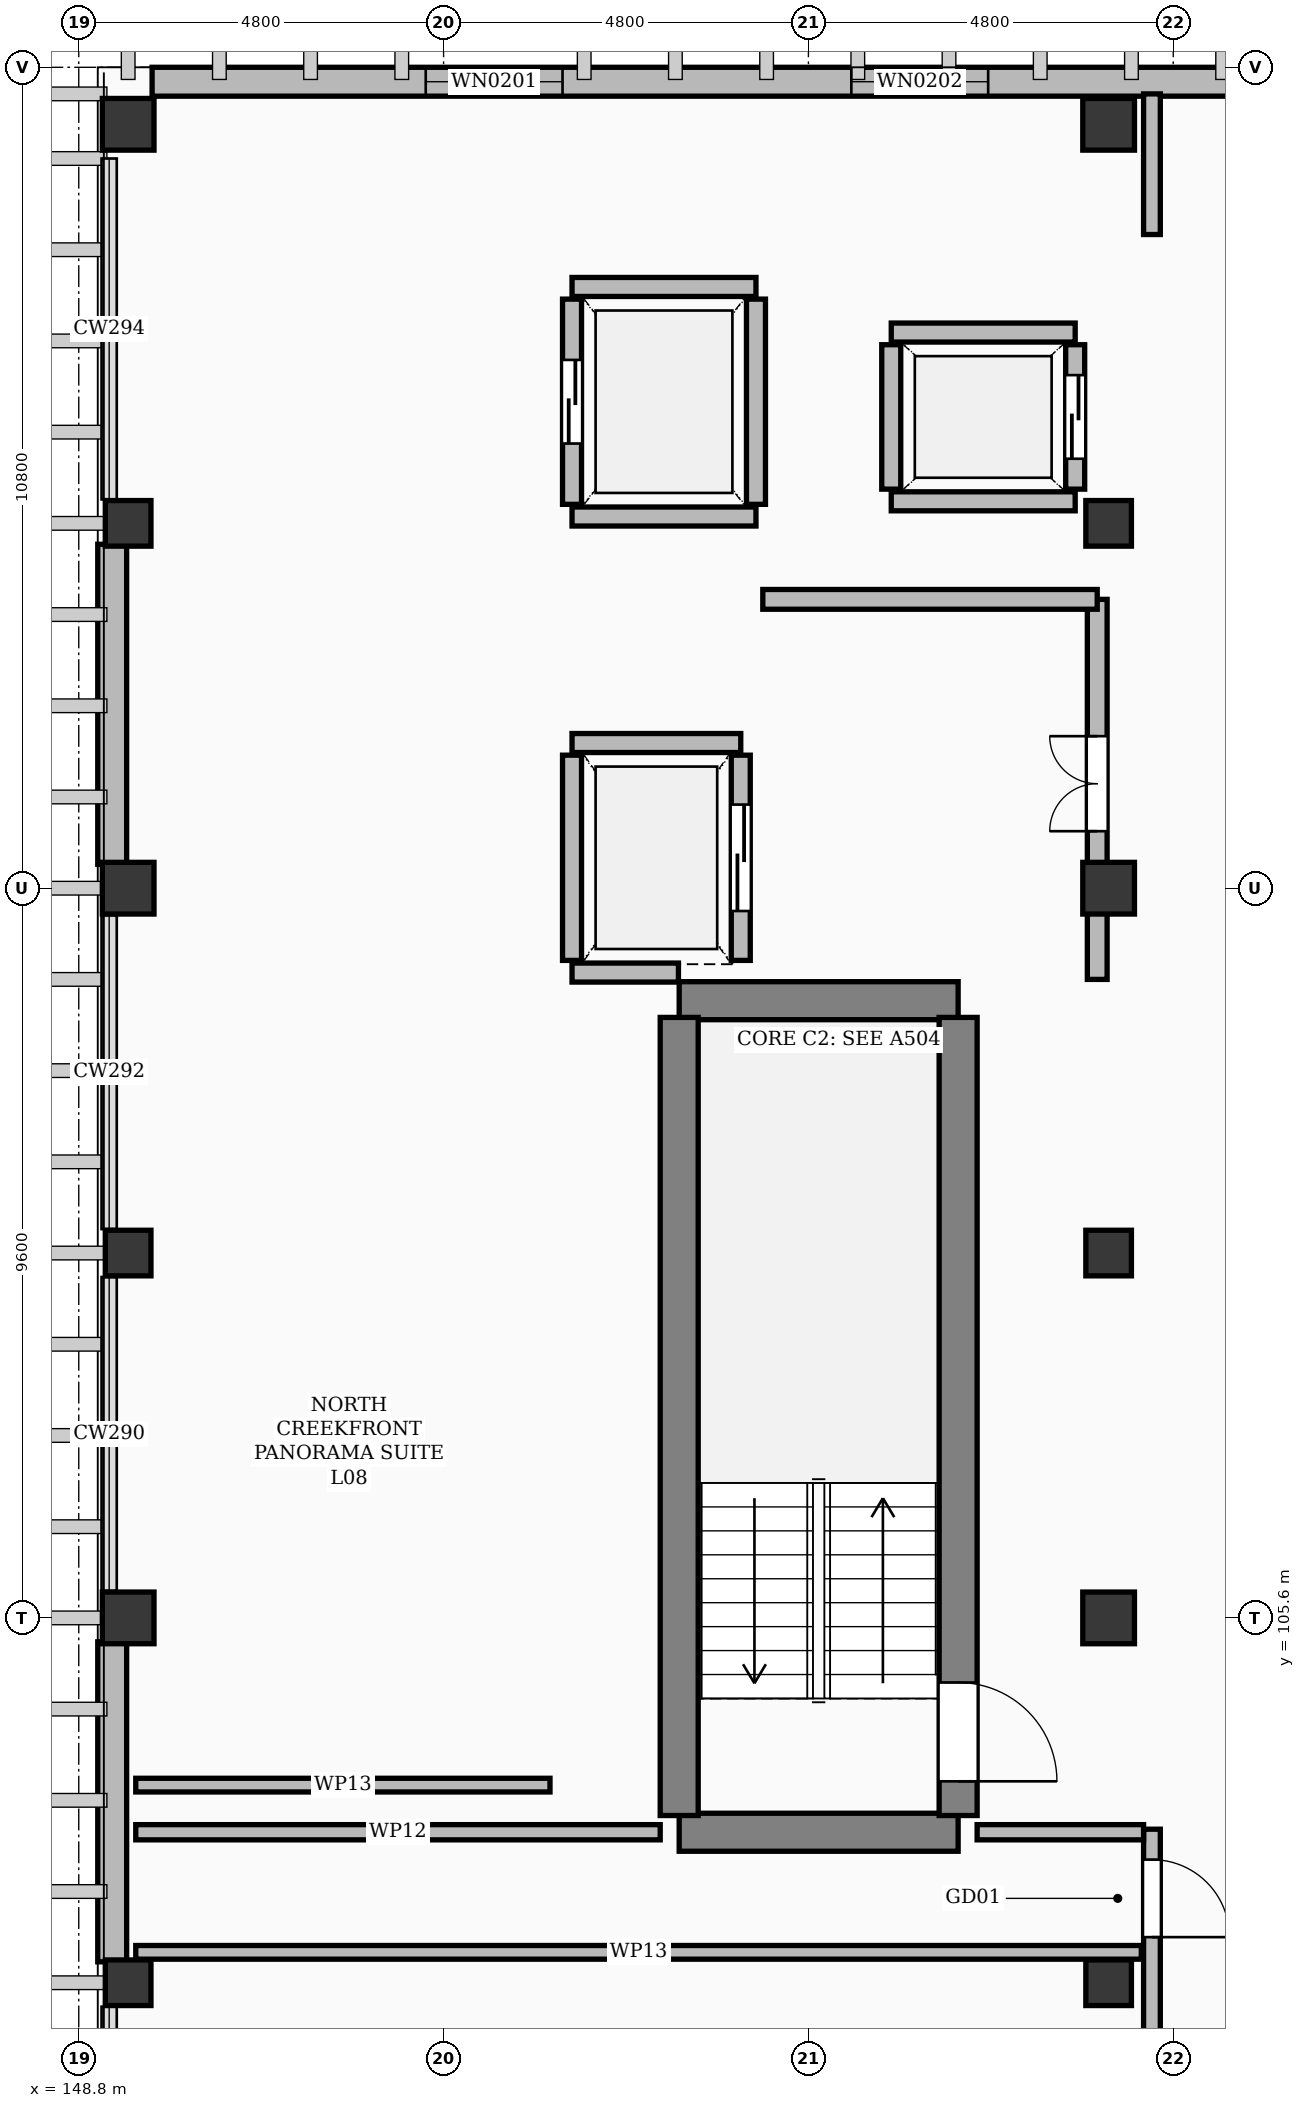
"""IFC4 building model, lengths in metres.
Left out: names, types, materials, properties, quantities, classifications, styles, units other than length and angle.
Written with IfcOpenShell. Run it as: python <this file> out.ifc"""

import sys

from ifc_helpers import new_model, si_unit, direction, frame, frame_2d, origin, origin_2d, place, context, subcontext, project, spatial, rectangle, extrude, element, fill, save


model = new_model("IFC4")
c1 = context("Model", 3, precision=1e-05, world=origin(), true_north=direction((0.0, 1.0)))
c2 = subcontext(c1, "Body", "Model", "MODEL_VIEW")
j1 = project(units=[si_unit("LENGTHUNIT", "METRE"), si_unit("PLANEANGLEUNIT", "RADIAN")], contexts=[c1])
p1 = place(None, origin())
s1 = spatial("IfcSite", under=j1, at=p1, CompositionType="ELEMENT")
p2 = place(p1, origin())
s2 = spatial("IfcBuilding", under=s1, at=p2, CompositionType="ELEMENT")
p3 = place(p2, frame((0.0, 0.0, 35.4)))
s3 = spatial("IfcBuildingStorey", under=s2, at=p3, CompositionType="ELEMENT", Elevation=35.4)
for number, where, z_axis, x_axis in (
    (1, (149.45, 105.6, 0.0), (0.0, 0.0, 1.0), (1.0, 0.0, 0.0)),
    (2, (149.45, 115.2, 0.0), (0.0, 0.0, 1.0), (1.0, 0.0, 0.0)),
    (3, (149.45, 125.25, 0.0), (0.0, 0.0, 1.0), (1.0, 0.0, 0.0)),
    (4, (162.35, 105.6, 0.0), (0.0, 0.0, 1.0), (1.0, 0.0, 0.0)),
    (5, (162.35, 115.2, 0.0), (0.0, 0.0, 1.0), (1.0, 0.0, 0.0)),
    (6, (162.35, 125.25, 0.0), (0.0, 0.0, 1.0), (1.0, 0.0, 0.0)),
):
    element("IfcColumn", number, at=place(p3, frame(where, z_axis=z_axis, x_axis=x_axis)), inside=s3, PredefinedType="COLUMN", context=c2, shape_type="SweptSolid", body=[
        extrude(rectangle(XDim=0.68, YDim=0.68, at=origin_2d()), origin(), (0.0, 0.0, 1.0), 3.6),
    ])
for number, where, z_axis, x_axis in (
    (7, (149.45, 100.8, 0.0), (0.0, 0.0, 1.0), (1.0, 0.0, 0.0)),
    (8, (149.45, 110.4, 0.0), (0.0, 0.0, 1.0), (1.0, 0.0, 0.0)),
    (9, (149.45, 120.0, 0.0), (0.0, 0.0, 1.0), (1.0, 0.0, 0.0)),
    (10, (162.35, 100.8, 0.0), (0.0, 0.0, 1.0), (1.0, 0.0, 0.0)),
    (11, (162.35, 110.4, 0.0), (0.0, 0.0, 1.0), (1.0, 0.0, 0.0)),
    (12, (162.35, 120.0, 0.0), (0.0, 0.0, 1.0), (1.0, 0.0, 0.0)),
):
    element("IfcColumn", number, at=place(p3, frame(where, z_axis=z_axis, x_axis=x_axis)), inside=s3, PredefinedType="COLUMN", context=c2, shape_type="SweptSolid", body=[
        extrude(rectangle(XDim=0.6, YDim=0.6, at=origin_2d()), origin(), (0.0, 0.0, 1.0), 3.6),
    ])
p4 = place(p3, frame((149.765, 125.81, 0.0), z_axis=(0.0, 0.0, 1.0), x_axis=(1.0, 0.0, 0.0)))
e13 = element("IfcWall", 13, at=p4, inside=s3, PredefinedType="SOLIDWALL", context=c2, shape_type="SweptSolid", body=[
    extrude(rectangle(XDim=29.27, YDim=0.38, at=frame_2d((14.635, 0.0))), origin(), (0.0, 0.0, 1.0), 3.36),
])
p5 = place(p4, frame((3.6, 0.0, 0.55)))
e14 = element("IfcOpeningElement", 14, at=p5, cuts=e13, PredefinedType="OPENING", context=c2, shape_type="SweptSolid", body=[
    extrude(rectangle(XDim=1.8, YDim=1.76, at=frame_2d((0.9, 0.88))), frame((0.0, 0.202, 0.0), z_axis=(0.0, -1.0, 0.0), x_axis=(1.0, 0.0, 0.0)), (0.0, 0.0, 1.0), 0.404),
])
p6 = place(p4, frame((9.2, 0.0, 0.55)))
e15 = element("IfcOpeningElement", 15, at=p6, cuts=e13, PredefinedType="OPENING", context=c2, shape_type="SweptSolid", body=[
    extrude(rectangle(XDim=1.8, YDim=1.76, at=frame_2d((0.9, 0.88))), frame((0.0, 0.202, 0.0), z_axis=(0.0, -1.0, 0.0), x_axis=(1.0, 0.0, 0.0)), (0.0, 0.0, 1.0), 0.404),
])
p7 = place(p4, frame((19.6, 0.0, 0.55)))
e16 = element("IfcOpeningElement", 16, at=p7, cuts=e13, PredefinedType="OPENING", context=c2, shape_type="SweptSolid", body=[
    extrude(rectangle(XDim=1.8, YDim=1.76, at=frame_2d((0.9, 0.88))), frame((0.0, 0.202, 0.0), z_axis=(0.0, -1.0, 0.0), x_axis=(1.0, 0.0, 0.0)), (0.0, 0.0, 1.0), 0.404),
])
p8 = place(p4, frame((25.2, 0.0, 0.55)))
e17 = element("IfcOpeningElement", 17, at=p8, cuts=e13, PredefinedType="OPENING", context=c2, shape_type="SweptSolid", body=[
    extrude(rectangle(XDim=1.8, YDim=1.76, at=frame_2d((0.9, 0.88))), frame((0.0, 0.202, 0.0), z_axis=(0.0, -1.0, 0.0), x_axis=(1.0, 0.0, 0.0)), (0.0, 0.0, 1.0), 0.404),
])
p9 = place(p3, frame((149.24, 101.075, 0.0), z_axis=(0.0, 0.0, 1.0), x_axis=(0.0, 1.0, 0.0)))
e18 = element("IfcWall", 18, at=p9, inside=s3, PredefinedType="SOLIDWALL", context=c2, shape_type="SweptSolid", body=[
    extrude(rectangle(XDim=4.21, YDim=0.38, at=frame_2d((2.105, 0.0))), origin(), (0.0, 0.0, 1.0), 2.732),
])
p10 = place(p3, frame((149.24, 115.515, 0.0), z_axis=(0.0, 0.0, 1.0), x_axis=(0.0, 1.0, 0.0)))
e19 = element("IfcWall", 19, at=p10, inside=s3, PredefinedType="SOLIDWALL", context=c2, shape_type="SweptSolid", body=[
    extrude(rectangle(XDim=4.21, YDim=0.38, at=frame_2d((2.105, 0.0))), origin(), (0.0, 0.0, 1.0), 2.732),
])
for number, where, z_axis, x_axis in (
    (20, (156.7, 102.78, 0.0), (0.0, 0.0, 1.0), (1.0, 0.0, 0.0)),
    (21, (156.7, 113.72, 0.0), (0.0, 0.0, 1.0), (1.0, 0.0, 0.0)),
):
    element("IfcWall", number, at=place(p3, frame(where, z_axis=z_axis, x_axis=x_axis)), inside=s3, PredefinedType="SHEAR", context=c2, shape_type="SweptSolid", body=[
        extrude(rectangle(XDim=3.67, YDim=0.5, at=frame_2d((1.835, 0.0))), origin(), (0.0, 0.0, 1.0), 3.36),
    ])
p11 = place(p3, frame((156.7, 103.0, 0.0), z_axis=(0.0, 0.0, 1.0), x_axis=(0.0, 1.0, 0.0)))
e22 = element("IfcWall", 22, at=p11, inside=s3, PredefinedType="SHEAR", context=c2, shape_type="SweptSolid", body=[
    extrude(rectangle(XDim=10.5, YDim=0.5, at=frame_2d((5.25, 0.0))), origin(), (0.0, 0.0, 1.0), 3.36),
])
p12 = place(p3, frame((160.37, 103.0, 0.0), z_axis=(0.0, 0.0, 1.0), x_axis=(0.0, 1.0, 0.0)))
e23 = element("IfcWall", 23, at=p12, inside=s3, PredefinedType="SHEAR", context=c2, shape_type="SweptSolid", body=[
    extrude(rectangle(XDim=10.5, YDim=0.5, at=frame_2d((5.25, 0.0))), origin(), (0.0, 0.0, 1.0), 3.36),
])
p13 = place(p12, frame((0.45, 0.0, 0.0)))
e24 = element("IfcOpeningElement", 24, at=p13, cuts=e23, PredefinedType="OPENING", context=c2, shape_type="SweptSolid", body=[
    extrude(rectangle(XDim=1.3, YDim=2.15, at=frame_2d((0.65, 1.075))), frame((0.0, 0.262, 0.0), z_axis=(0.0, -1.0, 0.0), x_axis=(1.0, 0.0, 0.0)), (0.0, 0.0, 1.0), 0.524),
])
p14 = place(p3, frame((155.29, 114.09, 0.0), z_axis=(0.0, 0.0, 1.0), x_axis=(1.0, 0.0, 0.0)))
e25 = element("IfcWall", 25, at=p14, inside=s3, PredefinedType="SOLIDWALL", context=c2, shape_type="SweptSolid", body=[
    extrude(rectangle(XDim=1.4, YDim=0.25, at=frame_2d((0.7, 0.0))), origin(), (0.0, 0.0, 1.0), 3.36),
])
p15 = place(p3, frame((155.29, 117.11, 0.0), z_axis=(0.0, 0.0, 1.0), x_axis=(1.0, 0.0, 0.0)))
e26 = element("IfcWall", 26, at=p15, inside=s3, PredefinedType="SOLIDWALL", context=c2, shape_type="SweptSolid", body=[
    extrude(rectangle(XDim=2.22, YDim=0.25, at=frame_2d((1.11, 0.0))), origin(), (0.0, 0.0, 1.0), 3.36),
])
p16 = place(p3, frame((155.29, 114.25, 0.0), z_axis=(0.0, 0.0, 1.0), x_axis=(0.0, 1.0, 0.0)))
e27 = element("IfcWall", 27, at=p16, inside=s3, PredefinedType="SOLIDWALL", context=c2, shape_type="SweptSolid", body=[
    extrude(rectangle(XDim=2.7, YDim=0.25, at=frame_2d((1.35, 0.0))), origin(), (0.0, 0.0, 1.0), 2.732),
])
p17 = place(p3, frame((157.51, 114.25, 0.0), z_axis=(0.0, 0.0, 1.0), x_axis=(0.0, 1.0, 0.0)))
e28 = element("IfcWall", 28, at=p17, inside=s3, PredefinedType="SOLIDWALL", context=c2, shape_type="SweptSolid", body=[
    extrude(rectangle(XDim=2.7, YDim=0.25, at=frame_2d((1.35, 0.0))), origin(), (0.0, 0.0, 1.0), 2.732),
])
p18 = place(p17, frame((0.65, 0.0, 0.0)))
e29 = element("IfcOpeningElement", 29, at=p18, cuts=e28, PredefinedType="OPENING", context=c2, shape_type="SweptSolid", body=[
    extrude(rectangle(XDim=1.4, YDim=2.3, at=frame_2d((0.7, 1.15))), frame((0.0, 0.137, 0.0), z_axis=(0.0, -1.0, 0.0), x_axis=(1.0, 0.0, 0.0)), (0.0, 0.0, 1.0), 0.274),
])
p19 = place(p3, frame((159.49, 120.29, 0.0), z_axis=(0.0, 0.0, 1.0), x_axis=(1.0, 0.0, 0.0)))
e30 = element("IfcWall", 30, at=p19, inside=s3, PredefinedType="SOLIDWALL", context=c2, shape_type="SweptSolid", body=[
    extrude(rectangle(XDim=2.42, YDim=0.25, at=frame_2d((1.21, 0.0))), origin(), (0.0, 0.0, 1.0), 2.732),
])
p20 = place(p3, frame((159.49, 122.51, 0.0), z_axis=(0.0, 0.0, 1.0), x_axis=(1.0, 0.0, 0.0)))
e31 = element("IfcWall", 31, at=p20, inside=s3, PredefinedType="SOLIDWALL", context=c2, shape_type="SweptSolid", body=[
    extrude(rectangle(XDim=2.42, YDim=0.25, at=frame_2d((1.21, 0.0))), origin(), (0.0, 0.0, 1.0), 3.36),
])
p21 = place(p3, frame((159.49, 120.45, 0.0), z_axis=(0.0, 0.0, 1.0), x_axis=(0.0, 1.0, 0.0)))
e32 = element("IfcWall", 32, at=p21, inside=s3, PredefinedType="SOLIDWALL", context=c2, shape_type="SweptSolid", body=[
    extrude(rectangle(XDim=1.9, YDim=0.25, at=frame_2d((0.95, 0.0))), origin(), (0.0, 0.0, 1.0), 3.36),
])
p22 = place(p3, frame((161.91, 120.45, 0.0), z_axis=(0.0, 0.0, 1.0), x_axis=(0.0, 1.0, 0.0)))
e33 = element("IfcWall", 33, at=p22, inside=s3, PredefinedType="SOLIDWALL", context=c2, shape_type="SweptSolid", body=[
    extrude(rectangle(XDim=1.9, YDim=0.25, at=frame_2d((0.95, 0.0))), origin(), (0.0, 0.0, 1.0), 3.36),
])
p23 = place(p22, frame((0.4, 0.0, 0.0)))
e34 = element("IfcOpeningElement", 34, at=p23, cuts=e33, PredefinedType="OPENING", context=c2, shape_type="SweptSolid", body=[
    extrude(rectangle(XDim=1.1, YDim=2.2, at=frame_2d((0.55, 1.1))), frame((0.0, 0.137, 0.0), z_axis=(0.0, -1.0, 0.0), x_axis=(1.0, 0.0, 0.0)), (0.0, 0.0, 1.0), 0.274),
])
p24 = place(p3, frame((155.29, 120.09, 0.0), z_axis=(0.0, 0.0, 1.0), x_axis=(1.0, 0.0, 0.0)))
e35 = element("IfcWall", 35, at=p24, inside=s3, PredefinedType="SOLIDWALL", context=c2, shape_type="SweptSolid", body=[
    extrude(rectangle(XDim=2.42, YDim=0.25, at=frame_2d((1.21, 0.0))), origin(), (0.0, 0.0, 1.0), 2.732),
])
p25 = place(p3, frame((155.29, 123.11, 0.0), z_axis=(0.0, 0.0, 1.0), x_axis=(1.0, 0.0, 0.0)))
e36 = element("IfcWall", 36, at=p25, inside=s3, PredefinedType="SOLIDWALL", context=c2, shape_type="SweptSolid", body=[
    extrude(rectangle(XDim=2.42, YDim=0.25, at=frame_2d((1.21, 0.0))), origin(), (0.0, 0.0, 1.0), 3.36),
])
p26 = place(p3, frame((155.29, 120.25, 0.0), z_axis=(0.0, 0.0, 1.0), x_axis=(0.0, 1.0, 0.0)))
e37 = element("IfcWall", 37, at=p26, inside=s3, PredefinedType="SOLIDWALL", context=c2, shape_type="SweptSolid", body=[
    extrude(rectangle(XDim=2.7, YDim=0.25, at=frame_2d((1.35, 0.0))), origin(), (0.0, 0.0, 1.0), 2.732),
])
p27 = place(p26, frame((0.8, 0.0, 0.0)))
e38 = element("IfcOpeningElement", 38, at=p27, cuts=e37, PredefinedType="OPENING", context=c2, shape_type="SweptSolid", body=[
    extrude(rectangle(XDim=1.1, YDim=2.2, at=frame_2d((0.55, 1.1))), frame((0.0, 0.137, 0.0), z_axis=(0.0, -1.0, 0.0), x_axis=(1.0, 0.0, 0.0)), (0.0, 0.0, 1.0), 0.274),
])
p28 = place(p3, frame((157.71, 120.25, 0.0), z_axis=(0.0, 0.0, 1.0), x_axis=(0.0, 1.0, 0.0)))
e39 = element("IfcWall", 39, at=p28, inside=s3, PredefinedType="SOLIDWALL", context=c2, shape_type="SweptSolid", body=[
    extrude(rectangle(XDim=2.7, YDim=0.25, at=frame_2d((1.35, 0.0))), origin(), (0.0, 0.0, 1.0), 2.732),
])
p29 = place(p3, frame((162.2, 114.0, 0.0), z_axis=(0.0, 0.0, 1.0), x_axis=(0.0, 1.0, 0.0)))
e40 = element("IfcWall", 40, at=p29, inside=s3, PredefinedType="SOLIDWALL", context=c2, shape_type="SweptSolid", body=[
    extrude(rectangle(XDim=5.0, YDim=0.26, at=frame_2d((2.5, 0.0))), origin(), (0.0, 0.0, 1.0), 2.732),
])
p30 = place(p29, frame((1.95, 0.0, 0.0)))
e41 = element("IfcOpeningElement", 41, at=p30, cuts=e40, PredefinedType="OPENING", context=c2, shape_type="SweptSolid", body=[
    extrude(rectangle(XDim=1.25, YDim=2.15, at=frame_2d((0.625, 1.075))), frame((0.0, 0.142, 0.0), z_axis=(0.0, -1.0, 0.0), x_axis=(1.0, 0.0, 0.0)), (0.0, 0.0, 1.0), 0.284),
])
p31 = place(p3, frame((157.8, 119.0, 0.0), z_axis=(0.0, 0.0, 1.0), x_axis=(1.0, 0.0, 0.0)))
e42 = element("IfcWall", 42, at=p31, inside=s3, PredefinedType="SOLIDWALL", context=c2, shape_type="SweptSolid", body=[
    extrude(rectangle(XDim=4.4, YDim=0.26, at=frame_2d((2.2, 0.0))), origin(), (0.0, 0.0, 1.0), 2.732),
])
p32 = place(p3, frame((162.92, 95.6, 0.0), z_axis=(0.0, 0.0, 1.0), x_axis=(0.0, 1.0, 0.0)))
e43 = element("IfcWall", 43, at=p32, inside=s3, PredefinedType="PARTITIONING", context=c2, shape_type="SweptSolid", body=[
    extrude(rectangle(XDim=7.22, YDim=0.22, at=frame_2d((3.61, 0.0))), origin(), (0.0, 0.0, 1.0), 2.732),
])
p33 = place(p32, frame((2.05, 0.0, 0.0)))
e44 = element("IfcOpeningElement", 44, at=p33, cuts=e43, PredefinedType="OPENING", context=c2, shape_type="SweptSolid", body=[
    extrude(rectangle(XDim=0.98, YDim=2.15, at=frame_2d((0.49, 1.075))), frame((0.0, 0.122, 0.0), z_axis=(0.0, -1.0, 0.0), x_axis=(1.0, 0.0, 0.0)), (0.0, 0.0, 1.0), 0.244),
])
p34 = place(p32, frame((5.8, 0.0, 0.0)))
e45 = element("IfcOpeningElement", 45, at=p34, cuts=e43, PredefinedType="OPENING", context=c2, shape_type="SweptSolid", body=[
    extrude(rectangle(XDim=1.02, YDim=2.2, at=frame_2d((0.51, 1.1))), frame((0.0, 0.122, 0.0), z_axis=(0.0, -1.0, 0.0), x_axis=(1.0, 0.0, 0.0)), (0.0, 0.0, 1.0), 0.244),
])
p35 = place(p3, frame((162.92, 123.8, 0.0), z_axis=(0.0, 0.0, 1.0), x_axis=(0.0, 1.0, 0.0)))
e46 = element("IfcWall", 46, at=p35, inside=s3, PredefinedType="PARTITIONING", context=c2, shape_type="SweptSolid", body=[
    extrude(rectangle(XDim=1.85, YDim=0.22, at=frame_2d((0.925, 0.0))), origin(), (0.0, 0.0, 1.0), 2.602),
])
p36 = place(p3, frame((149.55, 101.2, 0.0), z_axis=(0.0, 0.0, 1.0), x_axis=(1.0, 0.0, 0.0)))
e47 = element("IfcWall", 47, at=p36, inside=s3, PredefinedType="PARTITIONING", context=c2, shape_type="SweptSolid", body=[
    extrude(rectangle(XDim=13.23, YDim=0.18, at=frame_2d((6.615, 0.0))), origin(), (0.0, 0.0, 1.0), 2.732),
])
p37 = place(p3, frame((149.55, 102.78, 0.0), z_axis=(0.0, 0.0, 1.0), x_axis=(1.0, 0.0, 0.0)))
e48 = element("IfcWall", 48, at=p37, inside=s3, PredefinedType="PARTITIONING", context=c2, shape_type="SweptSolid", body=[
    extrude(rectangle(XDim=6.9, YDim=0.2, at=frame_2d((3.45, 0.0))), origin(), (0.0, 0.0, 1.0), 2.732),
])
p38 = place(p3, frame((160.62, 102.78, 0.0), z_axis=(0.0, 0.0, 1.0), x_axis=(1.0, 0.0, 0.0)))
e49 = element("IfcWall", 49, at=p38, inside=s3, PredefinedType="PARTITIONING", context=c2, shape_type="SweptSolid", body=[
    extrude(rectangle(XDim=2.19, YDim=0.2, at=frame_2d((1.095, 0.0))), origin(), (0.0, 0.0, 1.0), 2.732),
])
p39 = place(p3, frame((149.55, 103.4, 0.0), z_axis=(0.0, 0.0, 1.0), x_axis=(1.0, 0.0, 0.0)))
e50 = element("IfcWall", 50, at=p39, inside=s3, PredefinedType="PARTITIONING", context=c2, shape_type="SweptSolid", body=[
    extrude(rectangle(XDim=5.45, YDim=0.18, at=frame_2d((2.725, 0.0))), origin(), (0.0, 0.0, 1.0), 2.732),
])
p40 = place(p5, origin())
e51 = element("IfcWindow", 51, at=p40, inside=s3, PartitioningType="SINGLE_PANEL", PredefinedType="WINDOW", context=c2, shape_type="SweptSolid", body=[
    extrude(rectangle(XDim=1.8, YDim=1.76, at=frame_2d((0.9, 0.88))), frame((0.0, 0.03, 0.0), z_axis=(0.0, -1.0, 0.0), x_axis=(1.0, 0.0, 0.0)), (0.0, 0.0, 1.0), 0.06),
])
fill(e14, e51)
p41 = place(p6, origin())
e52 = element("IfcWindow", 52, at=p41, inside=s3, PartitioningType="SINGLE_PANEL", PredefinedType="WINDOW", context=c2, shape_type="SweptSolid", body=[
    extrude(rectangle(XDim=1.8, YDim=1.76, at=frame_2d((0.9, 0.88))), frame((0.0, 0.03, 0.0), z_axis=(0.0, -1.0, 0.0), x_axis=(1.0, 0.0, 0.0)), (0.0, 0.0, 1.0), 0.06),
])
fill(e15, e52)
p42 = place(p13, frame((1.3, 0.0, 0.0), z_axis=(0.0, 0.0, 1.0), x_axis=(-1.0, 0.0, 0.0)))
e53 = element("IfcDoor", 53, at=p42, inside=s3, OperationType="SINGLE_SWING_LEFT", PredefinedType="DOOR", context=c2, shape_type="SweptSolid", body=[
    extrude(rectangle(XDim=1.3, YDim=2.15, at=frame_2d((0.65, 1.075))), frame((0.0, 0.025, 0.0), z_axis=(0.0, -1.0, 0.0), x_axis=(1.0, 0.0, 0.0)), (0.0, 0.0, 1.0), 0.05),
])
fill(e24, e53)
p43 = place(p18, origin())
e54 = element("IfcDoor", 54, at=p43, inside=s3, OperationType="SLIDING_TO_LEFT", PredefinedType="DOOR", context=c2, shape_type="SweptSolid", body=[
    extrude(rectangle(XDim=1.4, YDim=2.3, at=frame_2d((0.7, 1.15))), frame((0.0, 0.025, 0.0), z_axis=(0.0, -1.0, 0.0), x_axis=(1.0, 0.0, 0.0)), (0.0, 0.0, 1.0), 0.05),
])
fill(e29, e54)
p44 = place(p23, origin())
e55 = element("IfcDoor", 55, at=p44, inside=s3, OperationType="SLIDING_TO_LEFT", PredefinedType="DOOR", context=c2, shape_type="SweptSolid", body=[
    extrude(rectangle(XDim=1.1, YDim=2.2, at=frame_2d((0.55, 1.1))), frame((0.0, 0.025, 0.0), z_axis=(0.0, -1.0, 0.0), x_axis=(1.0, 0.0, 0.0)), (0.0, 0.0, 1.0), 0.05),
])
fill(e34, e55)
p45 = place(p27, origin())
e56 = element("IfcDoor", 56, at=p45, inside=s3, OperationType="SLIDING_TO_LEFT", PredefinedType="DOOR", context=c2, shape_type="SweptSolid", body=[
    extrude(rectangle(XDim=1.1, YDim=2.2, at=frame_2d((0.55, 1.1))), frame((0.0, 0.025, 0.0), z_axis=(0.0, -1.0, 0.0), x_axis=(1.0, 0.0, 0.0)), (0.0, 0.0, 1.0), 0.05),
])
fill(e38, e56)
p46 = place(p30, origin())
e57 = element("IfcDoor", 57, at=p46, inside=s3, OperationType="DOUBLE_DOOR_SINGLE_SWING", PredefinedType="DOOR", context=c2, shape_type="SweptSolid", body=[
    extrude(rectangle(XDim=1.25, YDim=2.15, at=frame_2d((0.625, 1.075))), frame((0.0, 0.025, 0.0), z_axis=(0.0, -1.0, 0.0), x_axis=(1.0, 0.0, 0.0)), (0.0, 0.0, 1.0), 0.05),
])
fill(e41, e57)
p47 = place(p34, frame((1.02, 0.0, 0.0), z_axis=(0.0, 0.0, 1.0), x_axis=(-1.0, 0.0, 0.0)))
e58 = element("IfcDoor", 58, at=p47, inside=s3, OperationType="SINGLE_SWING_LEFT", PredefinedType="DOOR", context=c2, shape_type="SweptSolid", body=[
    extrude(rectangle(XDim=1.02, YDim=2.2, at=frame_2d((0.51, 1.1))), frame((0.0, 0.025, 0.0), z_axis=(0.0, -1.0, 0.0), x_axis=(1.0, 0.0, 0.0)), (0.0, 0.0, 1.0), 0.05),
])
fill(e45, e58)
save(model, sys.argv[1])
